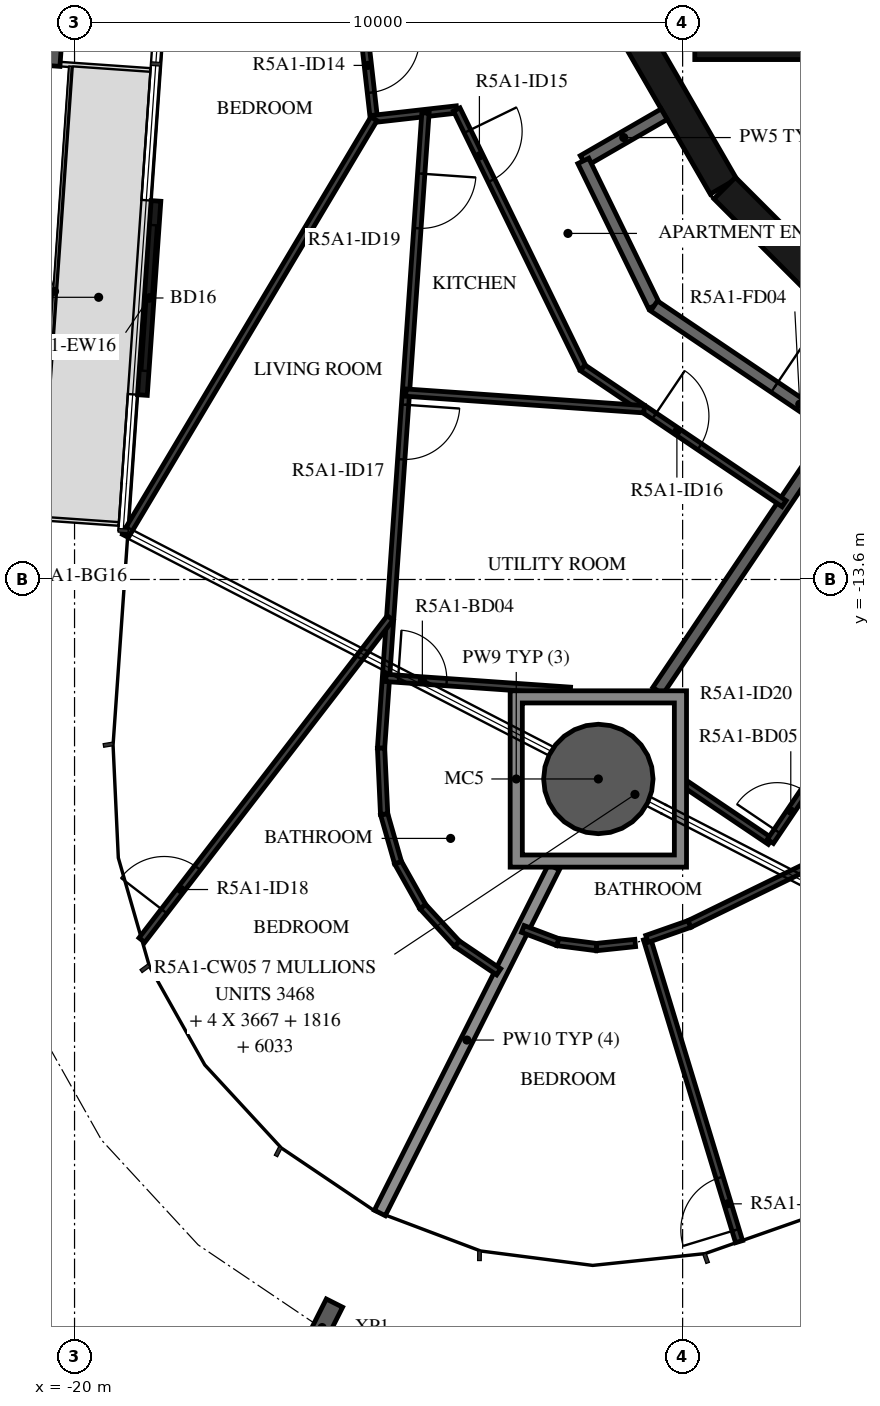
"""IFC4 building model, lengths in metres.
Left out: names, types, materials, properties, quantities, classifications, styles, units other than length and angle.
Written with IfcOpenShell. Run it as: python <this file> out.ifc"""

import sys

from ifc_helpers import new_model, si_unit, direction, frame, frame_2d, origin, origin_2d, place, context, subcontext, project, spatial, polyline, rectangle, hollow_circle, i_section, outline, extrude, element, fill, save


model = new_model("IFC4")
c1 = context("Model", 3, precision=1e-05, world=origin(), true_north=direction((0.0, 1.0)))
c2 = subcontext(c1, "Body", "Model", "MODEL_VIEW")
j1 = project(units=[si_unit("LENGTHUNIT", "METRE"), si_unit("PLANEANGLEUNIT", "RADIAN")], contexts=[c1])
p1 = place(None, origin())
s1 = spatial("IfcSite", under=j1, at=p1, CompositionType="ELEMENT")
p2 = place(p1, origin())
s2 = spatial("IfcBuilding", under=s1, at=p2, CompositionType="ELEMENT")
p3 = place(p2, frame((0.0, 0.0, 191.9)))
s3 = spatial("IfcBuildingStorey", under=s2, at=p3, CompositionType="ELEMENT", Elevation=191.9)
p4 = place(p3, frame((-11.386, -16.881, -0.38), z_axis=(0.0, 0.0, 1.0), x_axis=(1.0, 0.0, 0.0)))
e1 = element("IfcColumn", 1, at=p4, inside=s3, PredefinedType="COLUMN", context=c2, shape_type="SweptSolid", body=[
    extrude(hollow_circle(Radius=0.9, WallThickness=0.04, at=origin_2d()), origin(), (0.0, 0.0, 1.0), 3.5),
])
for number, where, z_axis, x_axis in (
    (2, (-20.679, -4.981, -0.38), (0.0, 0.0, 1.0), (0.07, 0.998, 0.0)),
    (3, (-15.928, -25.902, -0.38), (0.0, 0.0, 1.0), (-0.893, 0.45, 0.0)),
):
    element("IfcColumn", number, at=place(p3, frame(where, z_axis=z_axis, x_axis=x_axis)), inside=s3, PredefinedType="COLUMN", context=c2, shape_type="SweptSolid", body=[
        extrude(i_section(OverallWidth=0.3, OverallDepth=0.9, WebThickness=0.019, FlangeThickness=0.035, FilletRadius=0.03, at=origin_2d()), origin(), (0.0, 0.0, 1.0), 3.5),
    ])
p5 = place(p3, frame((-18.661, -7.375, 0.0), z_axis=(0.0, 0.0, 1.0), x_axis=(-0.069734222855, -0.997565605944, 0.0)))
e4 = element("IfcWall", 4, at=p5, inside=s3, PredefinedType="STANDARD", context=c2, shape_type="SweptSolid", body=[
    extrude(rectangle(XDim=3.2, YDim=0.16, at=frame_2d((1.6, 0.0))), origin(), (0.0, 0.0, 1.0), 3.12),
])
p6 = place(p5, frame((0.4, 0.0, 0.0)))
e5 = element("IfcOpeningElement", 5, at=p6, cuts=e4, PredefinedType="OPENING", context=c2, shape_type="SweptSolid", body=[
    extrude(rectangle(XDim=2.4, YDim=2.4, at=frame_2d((1.2, 1.2))), frame((0.0, 0.09, 0.0), z_axis=(0.0, -1.0, 0.0), x_axis=(1.0, 0.0, 0.0)), (0.0, 0.0, 1.0), 0.18),
])
p7 = place(p3, frame((-10.845, -4.51, 0.0), z_axis=(0.0, 0.0, 1.0), x_axis=(0.500087131594, -0.865975092491, 0.0)))
e6 = element("IfcWall", 6, at=p7, inside=s3, PredefinedType="SHEAR", context=c2, shape_type="SweptSolid", body=[
    extrude(rectangle(XDim=3.033, YDim=0.5, at=frame_2d((1.516, 0.0))), origin(), (0.0, 0.0, 1.0), 3.12),
])
p8 = place(p3, frame((-9.308, -7.164, 0.0), z_axis=(0.0, 0.0, 1.0), x_axis=(0.707106781187, -0.707106781187, 0.0)))
e7 = element("IfcWall", 7, at=p8, inside=s3, PredefinedType="SHEAR", context=c2, shape_type="SweptSolid", body=[
    extrude(rectangle(XDim=3.032, YDim=0.5, at=frame_2d((1.516, 0.0))), origin(), (0.0, 0.0, 1.0), 3.12),
])
p9 = place(p3, origin())
e8 = element("IfcWall", 8, at=p9, inside=s3, PredefinedType="SHEAR", context=c2, shape_type="SweptSolid", body=[
    extrude(outline(polyline([(9.8, -5.05), (9.8, -4.8), (9.8, -1.9), (9.55, -1.9), (9.55, -4.8), (7.65, -4.8), (7.65, -1.9), (7.4, -1.9), (7.4, -4.8), (5.5, -4.8), (5.5, -1.9), (5.25, -1.9), (5.25, -4.8), (3.35, -4.8), (3.35, -1.9), (3.1, -1.9), (3.1, -4.8), (1.2, -4.8), (1.2, -1.9), (0.95, -1.9), (0.95, -4.8), (-0.95, -4.8), (-0.95, -1.9), (-1.2, -1.9), (-1.2, -4.8), (-3.1, -4.8), (-3.1, -1.9), (-3.35, -1.9), (-3.35, -4.8), (-5.25, -4.8), (-5.25, -1.9), (-5.5, -1.9), (-5.5, -4.8), (-7.4, -4.8), (-7.4, -1.9), (-7.65, -1.9), (-7.65, -4.8), (-9.55, -4.8), (-9.55, -1.9), (-9.8, -1.9), (-9.8, -4.8), (-9.8, -5.05), (9.8, -5.05)])), origin(), (0.0, 0.0, 1.0), 3.12),
])
p10 = place(p3, frame((-10.303, -5.949, 0.0), z_axis=(0.0, 0.0, 1.0), x_axis=(-0.866042588199, -0.499970234539, 0.0)))
e9 = element("IfcWall", 9, at=p10, inside=s3, PredefinedType="STANDARD", context=c2, shape_type="SweptSolid", body=[
    extrude(rectangle(XDim=1.535, YDim=0.2, at=frame_2d((0.768, 0.0))), origin(), (0.0, 0.0, 1.0), 3.12),
])
p11 = place(p3, frame((-11.633, -6.716, 0.0), z_axis=(0.0, 0.0, 1.0), x_axis=(0.438322116278, -0.898817958422, 0.0)))
e10 = element("IfcWall", 10, at=p11, inside=s3, PredefinedType="STANDARD", context=c2, shape_type="SweptSolid", body=[
    extrude(rectangle(XDim=2.654, YDim=0.2, at=frame_2d((1.327, 0.0))), origin(), (0.0, 0.0, 1.0), 3.12),
])
p12 = place(p3, frame((-10.47, -9.101, 0.0), z_axis=(0.0, 0.0, 1.0), x_axis=(0.829035841718, -0.559195469534, 0.0)))
e11 = element("IfcWall", 11, at=p12, inside=s3, PredefinedType="STANDARD", context=c2, shape_type="SweptSolid", body=[
    extrude(rectangle(XDim=7.181, YDim=0.2, at=frame_2d((3.591, 0.0))), origin(), (0.0, 0.0, 1.0), 3.12),
])
p13 = place(p12, frame((2.39, 0.0, 0.0)))
e12 = element("IfcOpeningElement", 12, at=p13, cuts=e11, PredefinedType="OPENING", context=c2, shape_type="SweptSolid", body=[
    extrude(rectangle(XDim=1.0, YDim=2.1, at=frame_2d((0.5, 1.05))), frame((0.0, 0.11, 0.0), z_axis=(0.0, -1.0, 0.0), x_axis=(1.0, 0.0, 0.0)), (0.0, 0.0, 1.0), 0.22),
])
p14 = place(p3, frame((-10.407, -15.43, 0.0), z_axis=(0.0, 0.0, 1.0), x_axis=(0.559038328133, 0.829141813973, 0.0)))
e13 = element("IfcWall", 13, at=p14, inside=s3, PredefinedType="STANDARD", context=c2, shape_type="SweptSolid", body=[
    extrude(rectangle(XDim=5.212, YDim=0.2, at=frame_2d((2.606, 0.0))), origin(), (0.0, 0.0, 1.0), 3.12),
])
p15 = place(p3, frame((-14.979, -24.017, 0.0), z_axis=(0.0, 0.0, 1.0), x_axis=(0.449711952388, 0.893173644864, 0.0)))
e14 = element("IfcWall", 14, at=p15, inside=s3, PredefinedType="STANDARD", context=c2, shape_type="SweptSolid", body=[
    extrude(rectangle(XDim=6.367, YDim=0.2, at=frame_2d((3.184, 0.0))), origin(), (0.0, 0.0, 1.0), 2.73),
])
p16 = place(p3, frame((-15.25, -4.5, 0.0), z_axis=(0.0, 0.0, 1.0), x_axis=(0.1124919794, -0.99365263275, 0.0)))
e15 = element("IfcWall", 15, at=p16, inside=s3, PredefinedType="PARTITIONING", context=c2, shape_type="SweptSolid", body=[
    extrude(rectangle(XDim=1.534, YDim=0.12, at=frame_2d((0.767, 0.0))), origin(), (0.0, 0.0, 1.0), 3.12),
])
p17 = place(p16, frame((0.2, 0.0, 0.0)))
e16 = element("IfcOpeningElement", 16, at=p17, cuts=e15, PredefinedType="OPENING", context=c2, shape_type="SweptSolid", body=[
    extrude(rectangle(XDim=0.9, YDim=2.1, at=frame_2d((0.45, 1.05))), frame((0.0, 0.07, 0.0), z_axis=(0.0, -1.0, 0.0), x_axis=(1.0, 0.0, 0.0)), (0.0, 0.0, 1.0), 0.14),
])
p18 = place(p3, frame((-15.077, -6.025, 0.0), z_axis=(0.0, 0.0, 1.0), x_axis=(0.993646958109, 0.112542092746, 0.0)))
e17 = element("IfcWall", 17, at=p18, inside=s3, PredefinedType="PARTITIONING", context=c2, shape_type="SweptSolid", body=[
    extrude(rectangle(XDim=1.371, YDim=0.12, at=frame_2d((0.686, 0.0))), origin(), (0.0, 0.0, 1.0), 3.12),
])
p19 = place(p3, frame((-13.715, -5.87, 0.0), z_axis=(0.0, 0.0, 1.0), x_axis=(0.438372766482, -0.89879325632, 0.0)))
e18 = element("IfcWall", 18, at=p19, inside=s3, PredefinedType="PARTITIONING", context=c2, shape_type="SweptSolid", body=[
    extrude(rectangle(XDim=4.728, YDim=0.12, at=frame_2d((2.364, 0.0))), origin(), (0.0, 0.0, 1.0), 3.12),
])
p20 = place(p19, frame((0.4, 0.0, 0.0)))
e19 = element("IfcOpeningElement", 19, at=p20, cuts=e18, PredefinedType="OPENING", context=c2, shape_type="SweptSolid", body=[
    extrude(rectangle(XDim=0.9, YDim=2.1, at=frame_2d((0.45, 1.05))), frame((0.0, 0.07, 0.0), z_axis=(0.0, -1.0, 0.0), x_axis=(1.0, 0.0, 0.0)), (0.0, 0.0, 1.0), 0.14),
])
p21 = place(p3, frame((-11.642, -10.12, 0.0), z_axis=(0.0, 0.0, 1.0), x_axis=(0.829018066952, -0.559221820629, 0.0)))
e20 = element("IfcWall", 20, at=p21, inside=s3, PredefinedType="PARTITIONING", context=c2, shape_type="SweptSolid", body=[
    extrude(rectangle(XDim=3.992, YDim=0.12, at=frame_2d((1.996, 0.0))), origin(), (0.0, 0.0, 1.0), 3.12),
])
p22 = place(p21, frame((1.417, 0.0, 0.0)))
e21 = element("IfcOpeningElement", 21, at=p22, cuts=e20, PredefinedType="OPENING", context=c2, shape_type="SweptSolid", body=[
    extrude(rectangle(XDim=0.9, YDim=2.1, at=frame_2d((0.45, 1.05))), frame((0.0, 0.07, 0.0), z_axis=(0.0, -1.0, 0.0), x_axis=(1.0, 0.0, 0.0)), (0.0, 0.0, 1.0), 0.14),
])
p23 = place(p3, frame((-19.156, -12.863, 0.0), z_axis=(0.0, 0.0, 1.0), x_axis=(0.512316386407, 0.858796786335, 0.0)))
e22 = element("IfcWall", 22, at=p23, inside=s3, PredefinedType="PARTITIONING", context=c2, shape_type="SweptSolid", body=[
    extrude(rectangle(XDim=7.963, YDim=0.12, at=frame_2d((3.981, 0.0))), origin(), (0.0, 0.0, 1.0), 3.12),
])
p24 = place(p3, frame((-14.229, -5.929, 0.0), z_axis=(0.0, 0.0, 1.0), x_axis=(-0.069740723375, -0.997565151508, 0.0)))
e23 = element("IfcWall", 23, at=p24, inside=s3, PredefinedType="PARTITIONING", context=c2, shape_type="SweptSolid", body=[
    extrude(rectangle(XDim=10.47, YDim=0.12, at=frame_2d((5.235, 0.0))), origin(), (0.0, 0.0, 1.0), 3.12),
])
p25 = place(p24, frame((4.809, 0.0, 0.0)))
e24 = element("IfcOpeningElement", 24, at=p25, cuts=e23, PredefinedType="OPENING", context=c2, shape_type="SweptSolid", body=[
    extrude(rectangle(XDim=0.9, YDim=2.1, at=frame_2d((0.45, 1.05))), frame((0.0, 0.07, 0.0), z_axis=(0.0, -1.0, 0.0), x_axis=(1.0, 0.0, 0.0)), (0.0, 0.0, 1.0), 0.14),
])
p26 = place(p24, frame((1.0, 0.0, 0.0)))
e25 = element("IfcOpeningElement", 25, at=p26, cuts=e23, PredefinedType="OPENING", context=c2, shape_type="SweptSolid", body=[
    extrude(rectangle(XDim=0.9, YDim=2.1, at=frame_2d((0.45, 1.05))), frame((0.0, 0.07, 0.0), z_axis=(0.0, -1.0, 0.0), x_axis=(1.0, 0.0, 0.0)), (0.0, 0.0, 1.0), 0.14),
])
p27 = place(p3, frame((-14.551, -10.527, 0.0), z_axis=(0.0, 0.0, 1.0), x_axis=(0.997564247633, -0.069753651118, 0.0)))
e26 = element("IfcWall", 26, at=p27, inside=s3, PredefinedType="PARTITIONING", context=c2, shape_type="SweptSolid", body=[
    extrude(rectangle(XDim=3.927, YDim=0.12, at=frame_2d((1.963, 0.0))), origin(), (0.0, 0.0, 1.0), 3.12),
])
p28 = place(p3, frame((-18.892, -19.531, 0.0), z_axis=(0.0, 0.0, 1.0), x_axis=(0.610326128317, 0.792150249065, 0.0)))
e27 = element("IfcWall", 27, at=p28, inside=s3, PredefinedType="PARTITIONING", context=c2, shape_type="SweptSolid", body=[
    extrude(rectangle(XDim=6.689, YDim=0.12, at=frame_2d((3.345, 0.0))), origin(), (0.0, 0.0, 1.0), 3.12),
])
p29 = place(p28, frame((0.6, 0.0, 0.0)))
e28 = element("IfcOpeningElement", 28, at=p29, cuts=e27, PredefinedType="OPENING", context=c2, shape_type="SweptSolid", body=[
    extrude(rectangle(XDim=0.9, YDim=2.1, at=frame_2d((0.45, 1.05))), frame((0.0, 0.07, 0.0), z_axis=(0.0, -1.0, 0.0), x_axis=(1.0, 0.0, 0.0)), (0.0, 0.0, 1.0), 0.14),
])
p30 = place(p3, frame((-14.879, -15.219, 0.0), z_axis=(0.0, 0.0, 1.0), x_axis=(0.997566012813, -0.069728402248, 0.0)))
e29 = element("IfcWall", 29, at=p30, inside=s3, PredefinedType="PARTITIONING", context=c2, shape_type="SweptSolid", body=[
    extrude(rectangle(XDim=3.039, YDim=0.12, at=frame_2d((1.52, 0.0))), origin(), (0.0, 0.0, 1.0), 3.12),
])
p31 = place(p30, frame((0.2, 0.0, 0.0)))
e30 = element("IfcOpeningElement", 30, at=p31, cuts=e29, PredefinedType="OPENING", context=c2, shape_type="SweptSolid", body=[
    extrude(rectangle(XDim=0.8, YDim=2.1, at=frame_2d((0.4, 1.05))), frame((0.0, 0.07, 0.0), z_axis=(0.0, -1.0, 0.0), x_axis=(1.0, 0.0, 0.0)), (0.0, 0.0, 1.0), 0.14),
])
for number, where, z_axis, x_axis in (
    (31, (-13.025, -20.052, 0.0), (0.0, 0.0, 1.0), (-0.829, 0.559, 0.0)),
    (32, (-13.712, -19.588, 0.0), (0.0, 0.0, 1.0), (-0.678, 0.735, 0.0)),
):
    element("IfcWall", number, at=place(p3, frame(where, z_axis=z_axis, x_axis=x_axis)), inside=s3, PredefinedType="PARTITIONING", context=c2, shape_type="SweptSolid", body=[
        extrude(rectangle(XDim=0.829, YDim=0.12, at=frame_2d((0.415, 0.0))), origin(), (0.0, 0.0, 1.0), 3.12),
    ])
p32 = place(p3, frame((-14.274, -18.979, 0.0), z_axis=(0.0, 0.0, 1.0), x_axis=(-0.490037513137, 0.871701345484, 0.0)))
e33 = element("IfcWall", 33, at=p32, inside=s3, PredefinedType="PARTITIONING", context=c2, shape_type="SweptSolid", body=[
    extrude(rectangle(XDim=0.829, YDim=0.12, at=frame_2d((0.415, 0.0))), origin(), (0.0, 0.0, 1.0), 3.12),
])
p33 = place(p3, frame((-14.68, -18.256, 0.0), z_axis=(0.0, 0.0, 1.0), x_axis=(-0.275382358468, 0.961334778651, 0.0)))
e34 = element("IfcWall", 34, at=p33, inside=s3, PredefinedType="PARTITIONING", context=c2, shape_type="SweptSolid", body=[
    extrude(rectangle(XDim=0.829, YDim=0.12, at=frame_2d((0.415, 0.0))), origin(), (0.0, 0.0, 1.0), 3.12),
])
p34 = place(p3, frame((-14.909, -17.459, 0.0), z_axis=(0.0, 0.0, 1.0), x_axis=(-0.046497887649, 0.99891838828, 0.0)))
e35 = element("IfcWall", 35, at=p34, inside=s3, PredefinedType="PARTITIONING", context=c2, shape_type="SweptSolid", body=[
    extrude(rectangle(XDim=1.087, YDim=0.12, at=frame_2d((0.543, 0.0))), origin(), (0.0, 0.0, 1.0), 3.12),
])
p35 = place(p3, frame((-9.936, -16.976, 0.0), z_axis=(0.0, 0.0, 1.0), x_axis=(0.829057888835, -0.559162782167, 0.0)))
e36 = element("IfcWall", 36, at=p35, inside=s3, PredefinedType="PARTITIONING", context=c2, shape_type="SweptSolid", body=[
    extrude(rectangle(XDim=1.664, YDim=0.12, at=frame_2d((0.832, 0.0))), origin(), (0.0, 0.0, 1.0), 3.12),
])
p36 = place(p3, frame((-8.557, -17.906, 0.0), z_axis=(0.0, 0.0, 1.0), x_axis=(0.559194471553, 0.829036514868, 0.0)))
e37 = element("IfcWall", 37, at=p36, inside=s3, PredefinedType="PARTITIONING", context=c2, shape_type="SweptSolid", body=[
    extrude(rectangle(XDim=4.73, YDim=0.12, at=frame_2d((2.365, 0.0))), origin(), (0.0, 0.0, 1.0), 3.12),
])
p37 = place(p36, frame((0.2, 0.0, 0.0)))
e38 = element("IfcOpeningElement", 38, at=p37, cuts=e37, PredefinedType="OPENING", context=c2, shape_type="SweptSolid", body=[
    extrude(rectangle(XDim=0.8, YDim=2.1, at=frame_2d((0.4, 1.05))), frame((0.0, 0.07, 0.0), z_axis=(0.0, -1.0, 0.0), x_axis=(1.0, 0.0, 0.0)), (0.0, 0.0, 1.0), 0.14),
])
p38 = place(p36, frame((2.471, 0.0, 0.0)))
e39 = element("IfcOpeningElement", 39, at=p38, cuts=e37, PredefinedType="OPENING", context=c2, shape_type="SweptSolid", body=[
    extrude(rectangle(XDim=0.9, YDim=2.1, at=frame_2d((0.45, 1.05))), frame((0.0, 0.07, 0.0), z_axis=(0.0, -1.0, 0.0), x_axis=(1.0, 0.0, 0.0)), (0.0, 0.0, 1.0), 0.14),
])
p39 = place(p3, frame((-10.78, -19.578, 0.0), z_axis=(0.0, 0.0, 1.0), x_axis=(-0.994515867502, -0.104585798686, 0.0)))
e40 = element("IfcWall", 40, at=p39, inside=s3, PredefinedType="PARTITIONING", context=c2, shape_type="SweptSolid", body=[
    extrude(rectangle(XDim=0.642, YDim=0.12, at=frame_2d((0.321, 0.0))), origin(), (0.0, 0.0, 1.0), 3.12),
])
p40 = place(p3, frame((-11.418, -19.645, 0.0), z_axis=(0.0, 0.0, 1.0), x_axis=(-0.991802759529, 0.127778269633, 0.0)))
e41 = element("IfcWall", 41, at=p40, inside=s3, PredefinedType="PARTITIONING", context=c2, shape_type="SweptSolid", body=[
    extrude(rectangle(XDim=0.642, YDim=0.12, at=frame_2d((0.321, 0.0))), origin(), (0.0, 0.0, 1.0), 3.12),
])
p41 = place(p3, frame((-12.055, -19.563, 0.0), z_axis=(0.0, 0.0, 1.0), x_axis=(-0.935507243946, 0.353307509862, 0.0)))
e42 = element("IfcWall", 42, at=p41, inside=s3, PredefinedType="PARTITIONING", context=c2, shape_type="SweptSolid", body=[
    extrude(rectangle(XDim=0.612, YDim=0.12, at=frame_2d((0.306, 0.0))), origin(), (0.0, 0.0, 1.0), 3.12),
])
p42 = place(p3, frame((-9.072, -24.489, 0.0), z_axis=(0.0, 0.0, 1.0), x_axis=(-0.291025348593, 0.956715342449, 0.0)))
e43 = element("IfcWall", 43, at=p42, inside=s3, PredefinedType="PARTITIONING", context=c2, shape_type="SweptSolid", body=[
    extrude(rectangle(XDim=5.205, YDim=0.12, at=frame_2d((2.602, 0.0))), origin(), (0.0, 0.0, 1.0), 3.12),
])
p43 = place(p42, frame((0.2, 0.0, 0.0)))
e44 = element("IfcOpeningElement", 44, at=p43, cuts=e43, PredefinedType="OPENING", context=c2, shape_type="SweptSolid", body=[
    extrude(rectangle(XDim=0.9, YDim=2.1, at=frame_2d((0.45, 1.05))), frame((0.0, 0.07, 0.0), z_axis=(0.0, -1.0, 0.0), x_axis=(1.0, 0.0, 0.0)), (0.0, 0.0, 1.0), 0.14),
])
p44 = place(p3, frame((-10.586, -19.51, 0.0), z_axis=(0.0, 0.0, 1.0), x_axis=(0.943560277016, 0.3312008509, 0.0)))
e45 = element("IfcWall", 45, at=p44, inside=s3, PredefinedType="PARTITIONING", context=c2, shape_type="SweptSolid", body=[
    extrude(rectangle(XDim=0.741, YDim=0.12, at=frame_2d((0.371, 0.0))), origin(), (0.0, 0.0, 1.0), 3.12),
])
p45 = place(p3, frame((-9.886, -19.264, 0.0), z_axis=(0.0, 0.0, 1.0), x_axis=(0.898796326112, 0.43836647245, 0.0)))
e46 = element("IfcWall", 46, at=p45, inside=s3, PredefinedType="PARTITIONING", context=c2, shape_type="SweptSolid", body=[
    extrude(rectangle(XDim=10.014, YDim=0.12, at=frame_2d((5.007, 0.0))), origin(), (0.0, 0.0, 1.0), 3.12),
])
p46 = place(p45, frame((3.917, 0.0, 0.0)))
e47 = element("IfcOpeningElement", 47, at=p46, cuts=e46, PredefinedType="OPENING", context=c2, shape_type="SweptSolid", body=[
    extrude(rectangle(XDim=0.9, YDim=2.1, at=frame_2d((0.45, 1.05))), frame((0.0, 0.07, 0.0), z_axis=(0.0, -1.0, 0.0), x_axis=(1.0, 0.0, 0.0)), (0.0, 0.0, 1.0), 0.14),
])
p47 = place(p3, origin())
e48 = element("IfcWall", 48, at=p47, inside=s3, PredefinedType="STANDARD", context=c2, shape_type="SweptSolid", body=[
    extrude(outline(polyline([(-9.936, -15.43), (-9.936, -18.331), (-12.836, -18.331), (-12.836, -15.43), (-9.936, -15.43)]), holes=[polyline([(-12.636, -18.131), (-10.136, -18.131), (-10.136, -15.631), (-12.636, -15.631), (-12.636, -18.131)])]), origin(), (0.0, 0.0, 1.0), 3.12),
])
p48 = place(p6, origin())
e49 = element("IfcDoor", 49, at=p48, inside=s3, OperationType="DOUBLE_DOOR_SLIDING", PredefinedType="DOOR", context=c2, shape_type="SweptSolid", body=[
    extrude(rectangle(XDim=2.4, YDim=2.4, at=frame_2d((1.2, 1.2))), frame((0.0, 0.025, 0.0), z_axis=(0.0, -1.0, 0.0), x_axis=(1.0, 0.0, 0.0)), (0.0, 0.0, 1.0), 0.05),
])
fill(e5, e49)
p49 = place(p13, origin())
e50 = element("IfcDoor", 50, at=p49, inside=s3, OperationType="SINGLE_SWING_RIGHT", PredefinedType="DOOR", context=c2, shape_type="SweptSolid", body=[
    extrude(rectangle(XDim=1.0, YDim=2.1, at=frame_2d((0.5, 1.05))), frame((0.0, 0.025, 0.0), z_axis=(0.0, -1.0, 0.0), x_axis=(1.0, 0.0, 0.0)), (0.0, 0.0, 1.0), 0.05),
])
fill(e12, e50)
p50 = place(p17, origin())
e51 = element("IfcDoor", 51, at=p50, inside=s3, OperationType="SINGLE_SWING_RIGHT", PredefinedType="DOOR", context=c2, shape_type="SweptSolid", body=[
    extrude(rectangle(XDim=0.9, YDim=2.1, at=frame_2d((0.45, 1.05))), frame((0.0, 0.025, 0.0), z_axis=(0.0, -1.0, 0.0), x_axis=(1.0, 0.0, 0.0)), (0.0, 0.0, 1.0), 0.05),
])
fill(e16, e51)
p51 = place(p20, origin())
e52 = element("IfcDoor", 52, at=p51, inside=s3, OperationType="SINGLE_SWING_RIGHT", PredefinedType="DOOR", context=c2, shape_type="SweptSolid", body=[
    extrude(rectangle(XDim=0.9, YDim=2.1, at=frame_2d((0.45, 1.05))), frame((0.0, 0.025, 0.0), z_axis=(0.0, -1.0, 0.0), x_axis=(1.0, 0.0, 0.0)), (0.0, 0.0, 1.0), 0.05),
])
fill(e19, e52)
p52 = place(p22, origin())
e53 = element("IfcDoor", 53, at=p52, inside=s3, OperationType="SINGLE_SWING_RIGHT", PredefinedType="DOOR", context=c2, shape_type="SweptSolid", body=[
    extrude(rectangle(XDim=0.9, YDim=2.1, at=frame_2d((0.45, 1.05))), frame((0.0, 0.025, 0.0), z_axis=(0.0, -1.0, 0.0), x_axis=(1.0, 0.0, 0.0)), (0.0, 0.0, 1.0), 0.05),
])
fill(e21, e53)
p53 = place(p25, origin())
e54 = element("IfcDoor", 54, at=p53, inside=s3, OperationType="SINGLE_SWING_RIGHT", PredefinedType="DOOR", context=c2, shape_type="SweptSolid", body=[
    extrude(rectangle(XDim=0.9, YDim=2.1, at=frame_2d((0.45, 1.05))), frame((0.0, 0.025, 0.0), z_axis=(0.0, -1.0, 0.0), x_axis=(1.0, 0.0, 0.0)), (0.0, 0.0, 1.0), 0.05),
])
fill(e24, e54)
p54 = place(p31, origin())
e55 = element("IfcDoor", 55, at=p54, inside=s3, OperationType="SINGLE_SWING_RIGHT", PredefinedType="DOOR", context=c2, shape_type="SweptSolid", body=[
    extrude(rectangle(XDim=0.8, YDim=2.1, at=frame_2d((0.4, 1.05))), frame((0.0, 0.025, 0.0), z_axis=(0.0, -1.0, 0.0), x_axis=(1.0, 0.0, 0.0)), (0.0, 0.0, 1.0), 0.05),
])
fill(e30, e55)
p55 = place(p29, origin())
e56 = element("IfcDoor", 56, at=p55, inside=s3, OperationType="SINGLE_SWING_RIGHT", PredefinedType="DOOR", context=c2, shape_type="SweptSolid", body=[
    extrude(rectangle(XDim=0.9, YDim=2.1, at=frame_2d((0.45, 1.05))), frame((0.0, 0.025, 0.0), z_axis=(0.0, -1.0, 0.0), x_axis=(1.0, 0.0, 0.0)), (0.0, 0.0, 1.0), 0.05),
])
fill(e28, e56)
p56 = place(p26, origin())
e57 = element("IfcDoor", 57, at=p56, inside=s3, OperationType="SINGLE_SWING_LEFT", PredefinedType="DOOR", context=c2, shape_type="SweptSolid", body=[
    extrude(rectangle(XDim=0.9, YDim=2.1, at=frame_2d((0.45, 1.05))), frame((0.0, 0.025, 0.0), z_axis=(0.0, -1.0, 0.0), x_axis=(1.0, 0.0, 0.0)), (0.0, 0.0, 1.0), 0.05),
])
fill(e25, e57)
p57 = place(p37, origin())
e58 = element("IfcDoor", 58, at=p57, inside=s3, OperationType="SINGLE_SWING_LEFT", PredefinedType="DOOR", context=c2, shape_type="SweptSolid", body=[
    extrude(rectangle(XDim=0.8, YDim=2.1, at=frame_2d((0.4, 1.05))), frame((0.0, 0.025, 0.0), z_axis=(0.0, -1.0, 0.0), x_axis=(1.0, 0.0, 0.0)), (0.0, 0.0, 1.0), 0.05),
])
fill(e38, e58)
p58 = place(p43, origin())
e59 = element("IfcDoor", 59, at=p58, inside=s3, OperationType="SINGLE_SWING_LEFT", PredefinedType="DOOR", context=c2, shape_type="SweptSolid", body=[
    extrude(rectangle(XDim=0.9, YDim=2.1, at=frame_2d((0.45, 1.05))), frame((0.0, 0.025, 0.0), z_axis=(0.0, -1.0, 0.0), x_axis=(1.0, 0.0, 0.0)), (0.0, 0.0, 1.0), 0.05),
])
fill(e44, e59)
save(model, sys.argv[1])
